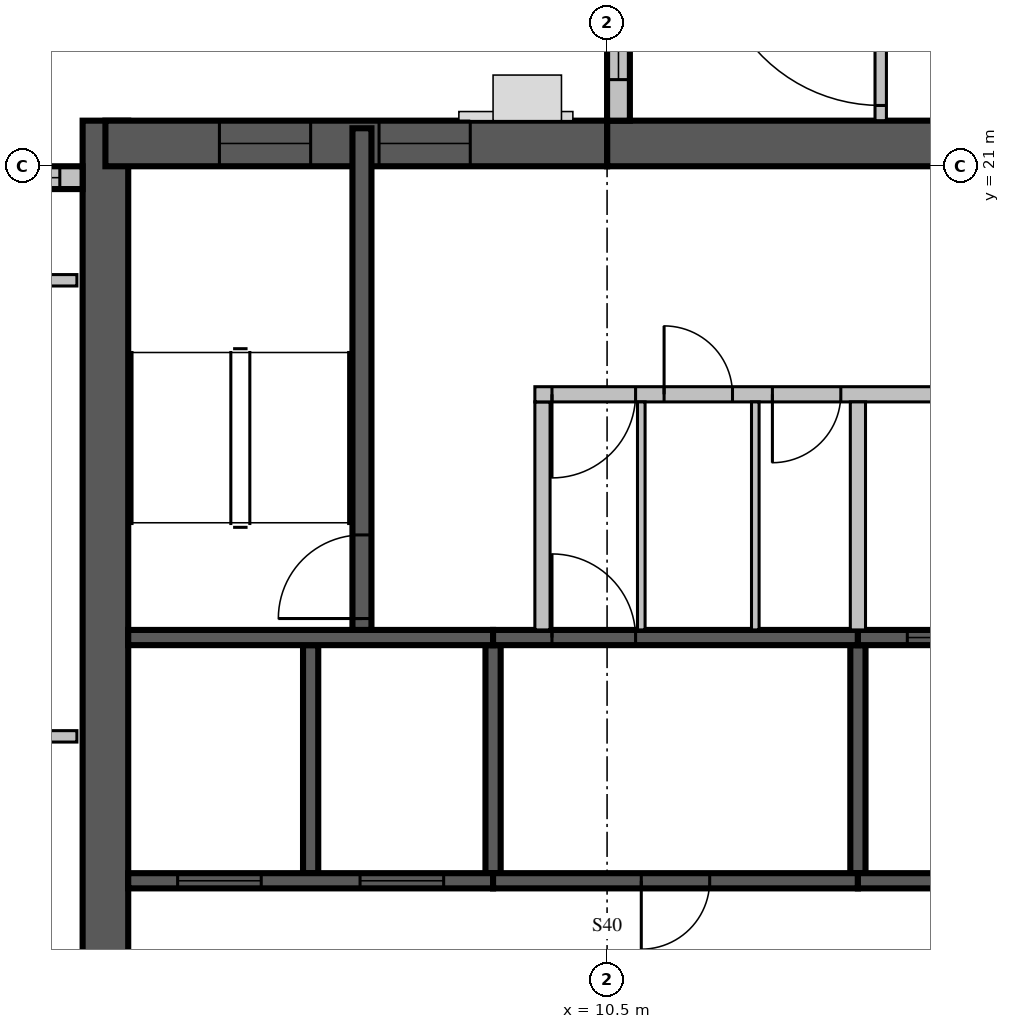
"""IFC4 building model, lengths in metres.
Left out: names, types, materials, properties, quantities, classifications, styles, units other than length and angle.
Written with IfcOpenShell. Run it as: python <this file> out.ifc"""

import sys

from ifc_helpers import new_model, si_unit, direction, frame, frame_2d, origin, place, context, subcontext, project, spatial, rectangle, extrude, source, transform, mapped, element, fill, save


model = new_model("IFC4")
c1 = context("Model", 3, precision=1e-05, world=origin(), true_north=direction((0.0, 1.0)))
c2 = subcontext(c1, "Body", "Model", "MODEL_VIEW")
j1 = project(units=[si_unit("LENGTHUNIT", "METRE"), si_unit("PLANEANGLEUNIT", "RADIAN")], contexts=[c1])
p1 = place(None, origin())
s1 = spatial("IfcSite", under=j1, at=p1, CompositionType="ELEMENT")
p2 = place(p1, origin())
s2 = spatial("IfcBuilding", under=s1, at=p2, CompositionType="ELEMENT")
p3 = place(p2, frame((0.0, 0.0, 330.0)))
s3 = spatial("IfcBuildingStorey", under=s2, at=p3, CompositionType="ELEMENT", Elevation=330.0)
m1 = source(origin(), c2, "Body", "SweptSolid", [
    extrude(rectangle(XDim=17.4, YDim=0.6, at=frame_2d((8.7, 0.0))), origin(), (0.0, 0.0, 1.0), 3.5),
])
p4 = place(p3, frame((3.9, 4.2, 0.0), z_axis=(0.0, 0.0, 1.0), x_axis=(0.0, 1.0, 0.0)))
e1 = element("IfcWall", 1, at=p4, inside=s3, PredefinedType="SHEAR", context=c2, shape_type="MappedRepresentation", body=[
    mapped(m1, transform((0.0, 0.0, 0.0), scale=1.0)),
])
m2 = source(origin(), c2, "Body", "SweptSolid", [
    extrude(rectangle(XDim=2.2, YDim=2.1, at=frame_2d((1.1, 1.05))), frame((0.0, 0.31, 0.0), z_axis=(0.0, -1.0, 0.0), x_axis=(1.0, 0.0, 0.0)), (0.0, 0.0, 1.0), 0.62),
])
p5 = place(p4, frame((4.2, 0.0, 0.0)))
e2 = element("IfcOpeningElement", 2, at=p5, cuts=e1, PredefinedType="OPENING", context=c2, shape_type="MappedRepresentation", body=[
    mapped(m2, transform((0.0, 0.0, 0.0), scale=1.0)),
])
m3 = source(origin(), c2, "Body", "SweptSolid", [
    extrude(rectangle(XDim=11.1, YDim=0.6, at=frame_2d((5.55, 0.0))), origin(), (0.0, 0.0, 1.0), 3.5),
])
p6 = place(p3, frame((10.5, 21.3, 0.0), z_axis=(0.0, 0.0, 1.0), x_axis=(1.0, 0.0, 0.0)))
e3 = element("IfcWall", 3, at=p6, inside=s3, PredefinedType="SHEAR", context=c2, shape_type="MappedRepresentation", body=[
    mapped(m3, transform((0.0, 0.0, 0.0), scale=1.0)),
])
m4 = source(origin(), c2, "Body", "SweptSolid", [
    extrude(rectangle(XDim=1.2, YDim=2.1, at=frame_2d((0.6, 1.05))), frame((0.0, 0.31, 0.0), z_axis=(0.0, -1.0, 0.0), x_axis=(1.0, 0.0, 0.0)), (0.0, 0.0, 1.0), 0.62),
])
p7 = place(p6, frame((8.7, 0.0, 0.0)))
e4 = element("IfcOpeningElement", 4, at=p7, cuts=e3, PredefinedType="OPENING", context=c2, shape_type="MappedRepresentation", body=[
    mapped(m4, transform((0.0, 0.0, 0.0), scale=1.0)),
])
m5 = source(origin(), c2, "Body", "SweptSolid", [
    extrude(rectangle(XDim=6.6, YDim=0.6, at=frame_2d((3.3, 0.0))), origin(), (0.0, 0.0, 1.0), 3.5),
])
p8 = place(p3, frame((3.9, 21.3, 0.0), z_axis=(0.0, 0.0, 1.0), x_axis=(1.0, 0.0, 0.0)))
e5 = element("IfcWall", 5, at=p8, inside=s3, PredefinedType="SHEAR", context=c2, shape_type="MappedRepresentation", body=[
    mapped(m5, transform((0.0, 0.0, 0.0), scale=1.0)),
])
m6 = source(origin(), c2, "Body", "SweptSolid", [
    extrude(rectangle(XDim=1.2, YDim=2.4, at=frame_2d((0.6, 1.2))), frame((0.0, 0.31, 0.0), z_axis=(0.0, -1.0, 0.0), x_axis=(1.0, 0.0, 0.0)), (0.0, 0.0, 1.0), 0.62),
])
p9 = place(p8, frame((1.5, 0.0, 0.6)))
e6 = element("IfcOpeningElement", 6, at=p9, cuts=e5, PredefinedType="OPENING", context=c2, shape_type="MappedRepresentation", body=[
    mapped(m6, transform((0.0, 0.0, 0.0), scale=1.0)),
])
p10 = place(p8, frame((3.6, 0.0, 0.6)))
e7 = element("IfcOpeningElement", 7, at=p10, cuts=e5, PredefinedType="OPENING", context=c2, shape_type="MappedRepresentation", body=[
    mapped(m6, transform((0.0, 0.0, 0.0), scale=1.0)),
])
m7 = source(origin(), c2, "Body", "SweptSolid", [
    extrude(rectangle(XDim=7.5, YDim=0.3, at=frame_2d((3.75, 0.0))), origin(), (0.0, 0.0, 1.0), 3.1),
])
p11 = place(p3, frame((10.65, 29.1, 0.0), z_axis=(0.0, 0.0, 1.0), x_axis=(0.0, -1.0, 0.0)))
e8 = element("IfcWall", 8, at=p11, inside=s3, PredefinedType="STANDARD", context=c2, shape_type="MappedRepresentation", body=[
    mapped(m7, transform((0.0, 0.0, 0.0), scale=1.0)),
])
m8 = source(origin(), c2, "Body", "SweptSolid", [
    extrude(rectangle(XDim=3.6, YDim=2.0, at=frame_2d((1.8, 1.0))), frame((0.0, 0.16, 0.0), z_axis=(0.0, -1.0, 0.0), x_axis=(1.0, 0.0, 0.0)), (0.0, 0.0, 1.0), 0.32),
])
p12 = place(p11, frame((3.36, 0.0, 0.6)))
e9 = element("IfcOpeningElement", 9, at=p12, cuts=e8, PredefinedType="OPENING", context=c2, shape_type="MappedRepresentation", body=[
    mapped(m8, transform((0.0, 0.0, 0.0), scale=1.0)),
])
m9 = source(origin(), c2, "Body", "SweptSolid", [
    extrude(rectangle(XDim=2.4, YDim=2.0, at=frame_2d((1.2, 1.0))), frame((0.0, 0.16, 0.0), z_axis=(0.0, -1.0, 0.0), x_axis=(1.0, 0.0, 0.0)), (0.0, 0.0, 1.0), 0.32),
])
p13 = place(p11, frame((0.48, 0.0, 0.6)))
e10 = element("IfcOpeningElement", 10, at=p13, cuts=e8, PredefinedType="OPENING", context=c2, shape_type="MappedRepresentation", body=[
    mapped(m9, transform((0.0, 0.0, 0.0), scale=1.0)),
])
m10 = source(origin(), c2, "Body", "SweptSolid", [
    extrude(rectangle(XDim=3.0, YDim=0.3, at=frame_2d((1.5, 0.0))), origin(), (0.0, 0.0, 1.0), 3.1),
])
p14 = place(p3, frame((3.6, 20.85, 0.0), z_axis=(0.0, 0.0, 1.0), x_axis=(-1.0, 0.0, 0.0)))
e11 = element("IfcWall", 11, at=p14, inside=s3, PredefinedType="STANDARD", context=c2, shape_type="MappedRepresentation", body=[
    mapped(m10, transform((0.0, 0.0, 0.0), scale=1.0)),
])
p15 = place(p14, frame((0.3, 0.0, 0.6)))
e12 = element("IfcOpeningElement", 12, at=p15, cuts=e11, PredefinedType="OPENING", context=c2, shape_type="MappedRepresentation", body=[
    mapped(m9, transform((0.0, 0.0, 0.0), scale=1.0)),
])
m11 = source(origin(), c2, "Body", "SweptSolid", [
    extrude(rectangle(XDim=3.0, YDim=0.2, at=frame_2d((1.5, 0.0))), origin(), (0.0, 0.0, 1.0), 3.5),
])
p16 = place(p3, frame((6.6, 11.7, 0.0), z_axis=(0.0, 0.0, 1.0), x_axis=(0.0, 1.0, 0.0)))
e13 = element("IfcWall", 13, at=p16, inside=s3, PredefinedType="SOLIDWALL", context=c2, shape_type="MappedRepresentation", body=[
    mapped(m11, transform((0.0, 0.0, 0.0), scale=1.0)),
])
m12 = source(origin(), c2, "Body", "SweptSolid", [
    extrude(rectangle(XDim=3.0, YDim=0.2, at=frame_2d((1.5, 0.0))), origin(), (0.0, 0.0, 1.0), 3.1),
])
for number, where, z_axis, x_axis in (
    (14, (9.0, 11.7, 0.0), (0.0, 0.0, 1.0), (0.0, 1.0, 0.0)),
    (15, (13.8, 11.7, 0.0), (0.0, 0.0, 1.0), (0.0, 1.0, 0.0)),
):
    element("IfcWall", number, at=place(p3, frame(where, z_axis=z_axis, x_axis=x_axis)), inside=s3, PredefinedType="SOLIDWALL", context=c2, shape_type="MappedRepresentation", body=[
        mapped(m12, transform((0.0, 0.0, 0.0), scale=1.0)),
    ])
m13 = source(origin(), c2, "Body", "SweptSolid", [
    extrude(rectangle(XDim=4.8, YDim=0.2, at=frame_2d((2.4, 0.0))), origin(), (0.0, 0.0, 1.0), 3.5),
])
p17 = place(p3, frame((4.2, 11.6, 0.0), z_axis=(0.0, 0.0, 1.0), x_axis=(1.0, 0.0, 0.0)))
e16 = element("IfcWall", 16, at=p17, inside=s3, PredefinedType="SOLIDWALL", context=c2, shape_type="MappedRepresentation", body=[
    mapped(m13, transform((0.0, 0.0, 0.0), scale=1.0)),
])
m14 = source(origin(), c2, "Body", "SweptSolid", [
    extrude(rectangle(XDim=1.1, YDim=2.1, at=frame_2d((0.55, 1.05))), frame((0.0, 0.11, 0.0), z_axis=(0.0, -1.0, 0.0), x_axis=(1.0, 0.0, 0.0)), (0.0, 0.0, 1.0), 0.22),
])
p18 = place(p17, frame((0.65, 0.0, 0.0)))
e17 = element("IfcOpeningElement", 17, at=p18, cuts=e16, PredefinedType="OPENING", context=c2, shape_type="MappedRepresentation", body=[
    mapped(m14, transform((0.0, 0.0, 0.0), scale=1.0)),
])
p19 = place(p17, frame((3.05, 0.0, 0.0)))
e18 = element("IfcOpeningElement", 18, at=p19, cuts=e16, PredefinedType="OPENING", context=c2, shape_type="MappedRepresentation", body=[
    mapped(m14, transform((0.0, 0.0, 0.0), scale=1.0)),
])
m15 = source(origin(), c2, "Body", "SweptSolid", [
    extrude(rectangle(XDim=4.8, YDim=0.2, at=frame_2d((2.4, 0.0))), origin(), (0.0, 0.0, 1.0), 3.1),
])
p20 = place(p3, frame((9.0, 11.6, 0.0), z_axis=(0.0, 0.0, 1.0), x_axis=(1.0, 0.0, 0.0)))
e19 = element("IfcWall", 19, at=p20, inside=s3, PredefinedType="SOLIDWALL", context=c2, shape_type="MappedRepresentation", body=[
    mapped(m15, transform((0.0, 0.0, 0.0), scale=1.0)),
])
m16 = source(origin(), c2, "Body", "SweptSolid", [
    extrude(rectangle(XDim=0.9, YDim=2.1, at=frame_2d((0.45, 1.05))), frame((0.0, 0.11, 0.0), z_axis=(0.0, -1.0, 0.0), x_axis=(1.0, 0.0, 0.0)), (0.0, 0.0, 1.0), 0.22),
])
p21 = place(p20, frame((1.95, 0.0, 0.0)))
e20 = element("IfcOpeningElement", 20, at=p21, cuts=e19, PredefinedType="OPENING", context=c2, shape_type="MappedRepresentation", body=[
    mapped(m16, transform((0.0, 0.0, 0.0), scale=1.0)),
])
m17 = source(origin(), c2, "Body", "SweptSolid", [
    extrude(rectangle(XDim=7.2, YDim=0.2, at=frame_2d((3.6, 0.0))), origin(), (0.0, 0.0, 1.0), 3.5),
])
p22 = place(p3, frame((13.8, 11.6, 0.0), z_axis=(0.0, 0.0, 1.0), x_axis=(1.0, 0.0, 0.0)))
e21 = element("IfcWall", 21, at=p22, inside=s3, PredefinedType="SOLIDWALL", context=c2, shape_type="MappedRepresentation", body=[
    mapped(m17, transform((0.0, 0.0, 0.0), scale=1.0)),
])
p23 = place(p3, frame((4.2, 14.8, 0.0), z_axis=(0.0, 0.0, 1.0), x_axis=(1.0, 0.0, 0.0)))
e22 = element("IfcWall", 22, at=p23, inside=s3, PredefinedType="SOLIDWALL", context=c2, shape_type="MappedRepresentation", body=[
    mapped(m13, transform((0.0, 0.0, 0.0), scale=1.0)),
])
p24 = place(p3, frame((9.0, 14.8, 0.0), z_axis=(0.0, 0.0, 1.0), x_axis=(1.0, 0.0, 0.0)))
e23 = element("IfcWall", 23, at=p24, inside=s3, PredefinedType="SOLIDWALL", context=c2, shape_type="MappedRepresentation", body=[
    mapped(m15, transform((0.0, 0.0, 0.0), scale=1.0)),
])
p25 = place(p24, frame((0.775, 0.0, 0.0)))
e24 = element("IfcOpeningElement", 24, at=p25, cuts=e23, PredefinedType="OPENING", context=c2, shape_type="MappedRepresentation", body=[
    mapped(m14, transform((0.0, 0.0, 0.0), scale=1.0)),
])
p26 = place(p3, frame((13.8, 14.8, 0.0), z_axis=(0.0, 0.0, 1.0), x_axis=(1.0, 0.0, 0.0)))
e25 = element("IfcWall", 25, at=p26, inside=s3, PredefinedType="SOLIDWALL", context=c2, shape_type="MappedRepresentation", body=[
    mapped(m17, transform((0.0, 0.0, 0.0), scale=1.0)),
])
p27 = place(p26, frame((0.65, 0.0, 0.0)))
e26 = element("IfcOpeningElement", 26, at=p27, cuts=e25, PredefinedType="OPENING", context=c2, shape_type="MappedRepresentation", body=[
    mapped(m14, transform((0.0, 0.0, 0.0), scale=1.0)),
])
p28 = place(p26, frame((3.05, 0.0, 0.0)))
e27 = element("IfcOpeningElement", 27, at=p28, cuts=e25, PredefinedType="OPENING", context=c2, shape_type="MappedRepresentation", body=[
    mapped(m14, transform((0.0, 0.0, 0.0), scale=1.0)),
])
p29 = place(p26, frame((5.45, 0.0, 0.0)))
e28 = element("IfcOpeningElement", 28, at=p29, cuts=e25, PredefinedType="OPENING", context=c2, shape_type="MappedRepresentation", body=[
    mapped(m14, transform((0.0, 0.0, 0.0), scale=1.0)),
])
m18 = source(origin(), c2, "Body", "SweptSolid", [
    extrude(rectangle(XDim=6.6, YDim=0.25, at=frame_2d((3.3, 0.0))), origin(), (0.0, 0.0, 1.0), 3.1),
])
p30 = place(p3, frame((7.275, 14.9, 0.0), z_axis=(0.0, 0.0, 1.0), x_axis=(0.0, 1.0, 0.0)))
e29 = element("IfcWall", 29, at=p30, inside=s3, PredefinedType="SOLIDWALL", context=c2, shape_type="MappedRepresentation", body=[
    mapped(m18, transform((0.0, 0.0, 0.0), scale=1.0)),
])
m19 = source(origin(), c2, "Body", "SweptSolid", [
    extrude(rectangle(XDim=1.1, YDim=2.1, at=frame_2d((0.55, 1.05))), frame((0.0, 0.135, 0.0), z_axis=(0.0, -1.0, 0.0), x_axis=(1.0, 0.0, 0.0)), (0.0, 0.0, 1.0), 0.27),
])
p31 = place(p30, frame((0.15, 0.0, 0.0)))
e30 = element("IfcOpeningElement", 30, at=p31, cuts=e29, PredefinedType="OPENING", context=c2, shape_type="MappedRepresentation", body=[
    mapped(m19, transform((0.0, 0.0, 0.0), scale=1.0)),
])
m20 = source(origin(), c2, "Body", "SweptSolid", [
    extrude(rectangle(XDim=3.0, YDim=0.2, at=frame_2d((1.5, 0.0))), origin(), (0.0, 0.0, 1.0), 3.1),
])
p32 = place(p3, frame((9.65, 14.9, 0.0), z_axis=(0.0, 0.0, 1.0), x_axis=(0.0, 1.0, 0.0)))
e31 = element("IfcWall", 31, at=p32, inside=s3, PredefinedType="PARTITIONING", context=c2, shape_type="MappedRepresentation", body=[
    mapped(m20, transform((0.0, 0.0, 0.0), scale=1.0)),
])
m21 = source(origin(), c2, "Body", "SweptSolid", [
    extrude(rectangle(XDim=11.45, YDim=0.2, at=frame_2d((5.725, 0.0))), origin(), (0.0, 0.0, 1.0), 3.1),
])
p33 = place(p3, frame((9.55, 18.0, 0.0), z_axis=(0.0, 0.0, 1.0), x_axis=(1.0, 0.0, 0.0)))
e32 = element("IfcWall", 32, at=p33, inside=s3, PredefinedType="PARTITIONING", context=c2, shape_type="MappedRepresentation", body=[
    mapped(m21, transform((0.0, 0.0, 0.0), scale=1.0)),
])
p34 = place(p33, frame((0.225, 0.0, 0.0)))
e33 = element("IfcOpeningElement", 33, at=p34, cuts=e32, PredefinedType="OPENING", context=c2, shape_type="MappedRepresentation", body=[
    mapped(m14, transform((0.0, 0.0, 0.0), scale=1.0)),
])
p35 = place(p33, frame((1.7, 0.0, 0.0)))
e34 = element("IfcOpeningElement", 34, at=p35, cuts=e32, PredefinedType="OPENING", context=c2, shape_type="MappedRepresentation", body=[
    mapped(m16, transform((0.0, 0.0, 0.0), scale=1.0)),
])
p36 = place(p33, frame((3.125, 0.0, 0.0)))
e35 = element("IfcOpeningElement", 35, at=p36, cuts=e32, PredefinedType="OPENING", context=c2, shape_type="MappedRepresentation", body=[
    mapped(m16, transform((0.0, 0.0, 0.0), scale=1.0)),
])
p37 = place(p33, frame((7.35, 0.0, 0.0)))
e36 = element("IfcOpeningElement", 36, at=p37, cuts=e32, PredefinedType="OPENING", context=c2, shape_type="MappedRepresentation", body=[
    mapped(m14, transform((0.0, 0.0, 0.0), scale=1.0)),
])
p38 = place(p3, frame((13.8, 14.9, 0.0), z_axis=(0.0, 0.0, 1.0), x_axis=(0.0, 1.0, 0.0)))
e37 = element("IfcWall", 37, at=p38, inside=s3, PredefinedType="PARTITIONING", context=c2, shape_type="MappedRepresentation", body=[
    mapped(m20, transform((0.0, 0.0, 0.0), scale=1.0)),
])
m22 = source(origin(), c2, "Body", "SweptSolid", [
    extrude(rectangle(XDim=3.0, YDim=0.1, at=frame_2d((1.5, 0.0))), origin(), (0.0, 0.0, 1.0), 3.1),
])
for number, where, z_axis, x_axis in (
    (38, (10.95, 14.9, 0.0), (0.0, 0.0, 1.0), (0.0, 1.0, 0.0)),
    (39, (12.45, 14.9, 0.0), (0.0, 0.0, 1.0), (0.0, 1.0, 0.0)),
):
    element("IfcWall", number, at=place(p3, frame(where, z_axis=z_axis, x_axis=x_axis)), inside=s3, PredefinedType="PARTITIONING", context=c2, shape_type="MappedRepresentation", body=[
        mapped(m22, transform((0.0, 0.0, 0.0), scale=1.0)),
    ])
m23 = source(origin(), c2, "Body", "SweptSolid", [
    extrude(rectangle(XDim=3.225, YDim=0.15, at=frame_2d((1.613, 0.0))), origin(), (0.0, 0.0, 1.0), 3.1),
])
p39 = place(p3, frame((0.3, 13.5, 0.0), z_axis=(0.0, 0.0, 1.0), x_axis=(1.0, 0.0, 0.0)))
e40 = element("IfcWall", 40, at=p39, inside=s3, PredefinedType="PARTITIONING", context=c2, shape_type="MappedRepresentation", body=[
    mapped(m23, transform((0.0, 0.0, 0.0), scale=1.0)),
])
m24 = source(origin(), c2, "Body", "SweptSolid", [
    extrude(rectangle(XDim=0.9, YDim=2.1, at=frame_2d((0.45, 1.05))), frame((0.0, 0.085, 0.0), z_axis=(0.0, -1.0, 0.0), x_axis=(1.0, 0.0, 0.0)), (0.0, 0.0, 1.0), 0.17),
])
p40 = place(p39, frame((1.2, 0.0, 0.0)))
e41 = element("IfcOpeningElement", 41, at=p40, cuts=e40, PredefinedType="OPENING", context=c2, shape_type="MappedRepresentation", body=[
    mapped(m24, transform((0.0, 0.0, 0.0), scale=1.0)),
])
p41 = place(p3, frame((0.3, 19.5, 0.0), z_axis=(0.0, 0.0, 1.0), x_axis=(1.0, 0.0, 0.0)))
e42 = element("IfcWall", 42, at=p41, inside=s3, PredefinedType="PARTITIONING", context=c2, shape_type="MappedRepresentation", body=[
    mapped(m23, transform((0.0, 0.0, 0.0), scale=1.0)),
])
p42 = place(p41, frame((1.2, 0.0, 0.0)))
e43 = element("IfcOpeningElement", 43, at=p42, cuts=e42, PredefinedType="OPENING", context=c2, shape_type="MappedRepresentation", body=[
    mapped(m24, transform((0.0, 0.0, 0.0), scale=1.0)),
])
m25 = source(origin(), c2, "Body", "SweptSolid", [
    extrude(rectangle(XDim=7.725, YDim=0.15, at=frame_2d((3.862, 0.0))), origin(), (0.0, 0.0, 1.0), 3.1),
])
p43 = place(p3, frame((14.1, 29.325, 0.0), z_axis=(0.0, 0.0, 1.0), x_axis=(0.0, -1.0, 0.0)))
e44 = element("IfcWall", 44, at=p43, inside=s3, PredefinedType="PARTITIONING", context=c2, shape_type="MappedRepresentation", body=[
    mapped(m25, transform((0.0, 0.0, 0.0), scale=1.0)),
])
m26 = source(origin(), c2, "Body", "SweptSolid", [
    extrude(rectangle(XDim=2.2, YDim=2.1, at=frame_2d((1.1, 1.05))), frame((0.0, 0.085, 0.0), z_axis=(0.0, -1.0, 0.0), x_axis=(1.0, 0.0, 0.0)), (0.0, 0.0, 1.0), 0.17),
])
p44 = place(p43, frame((5.325, 0.0, 0.0)))
e45 = element("IfcOpeningElement", 45, at=p44, cuts=e44, PredefinedType="OPENING", context=c2, shape_type="MappedRepresentation", body=[
    mapped(m26, transform((0.0, 0.0, 0.0), scale=1.0)),
])
m27 = source(origin(), c2, "Body", "SweptSolid", [
    extrude(rectangle(XDim=3.6, YDim=2.0, at=frame_2d((1.8, 1.0))), frame((0.0, 0.03, 0.0), z_axis=(0.0, -1.0, 0.0), x_axis=(1.0, 0.0, 0.0)), (0.0, 0.0, 1.0), 0.06),
])
p45 = place(p12, origin())
e46 = element("IfcWindow", 46, at=p45, inside=s3, PartitioningType="SINGLE_PANEL", PredefinedType="WINDOW", context=c2, shape_type="MappedRepresentation", body=[
    mapped(m27, transform((0.0, 0.0, 0.0), scale=1.0)),
])
fill(e9, e46)
m28 = source(origin(), c2, "Body", "SweptSolid", [
    extrude(rectangle(XDim=2.4, YDim=2.0, at=frame_2d((1.2, 1.0))), frame((0.0, 0.03, 0.0), z_axis=(0.0, -1.0, 0.0), x_axis=(1.0, 0.0, 0.0)), (0.0, 0.0, 1.0), 0.06),
])
p46 = place(p15, origin())
e47 = element("IfcWindow", 47, at=p46, inside=s3, PartitioningType="SINGLE_PANEL", PredefinedType="WINDOW", context=c2, shape_type="MappedRepresentation", body=[
    mapped(m28, transform((0.0, 0.0, 0.0), scale=1.0)),
])
fill(e12, e47)
m29 = source(origin(), c2, "Body", "SweptSolid", [
    extrude(rectangle(XDim=1.1, YDim=2.1, at=frame_2d((0.55, 1.05))), frame((0.0, 0.025, 0.0), z_axis=(0.0, -1.0, 0.0), x_axis=(1.0, 0.0, 0.0)), (0.0, 0.0, 1.0), 0.05),
])
p47 = place(p18, origin())
e48 = element("IfcDoor", 48, at=p47, inside=s3, OperationType="SLIDING_TO_LEFT", PredefinedType="DOOR", context=c2, shape_type="MappedRepresentation", body=[
    mapped(m29, transform((0.0, 0.0, 0.0), scale=1.0)),
])
fill(e17, e48)
p48 = place(p19, origin())
e49 = element("IfcDoor", 49, at=p48, inside=s3, OperationType="SLIDING_TO_LEFT", PredefinedType="DOOR", context=c2, shape_type="MappedRepresentation", body=[
    mapped(m29, transform((0.0, 0.0, 0.0), scale=1.0)),
])
fill(e18, e49)
m30 = source(origin(), c2, "Body", "SweptSolid", [
    extrude(rectangle(XDim=0.9, YDim=2.1, at=frame_2d((0.45, 1.05))), frame((0.0, 0.025, 0.0), z_axis=(0.0, -1.0, 0.0), x_axis=(1.0, 0.0, 0.0)), (0.0, 0.0, 1.0), 0.05),
])
p49 = place(p21, origin())
e50 = element("IfcDoor", 50, at=p49, inside=s3, OperationType="SINGLE_SWING_RIGHT", PredefinedType="DOOR", context=c2, shape_type="MappedRepresentation", body=[
    mapped(m30, transform((0.0, 0.0, 0.0), scale=1.0)),
])
fill(e20, e50)
p50 = place(p25, origin())
e51 = element("IfcDoor", 51, at=p50, inside=s3, OperationType="SINGLE_SWING_LEFT", PredefinedType="DOOR", context=c2, shape_type="MappedRepresentation", body=[
    mapped(m29, transform((0.0, 0.0, 0.0), scale=1.0)),
])
fill(e24, e51)
p51 = place(p27, origin())
e52 = element("IfcDoor", 52, at=p51, inside=s3, OperationType="SLIDING_TO_LEFT", PredefinedType="DOOR", context=c2, shape_type="MappedRepresentation", body=[
    mapped(m29, transform((0.0, 0.0, 0.0), scale=1.0)),
])
fill(e26, e52)
p52 = place(p31, origin())
e53 = element("IfcDoor", 53, at=p52, inside=s3, OperationType="SINGLE_SWING_LEFT", PredefinedType="DOOR", context=c2, shape_type="MappedRepresentation", body=[
    mapped(m29, transform((0.0, 0.0, 0.0), scale=1.0)),
])
fill(e30, e53)
p53 = place(p34, origin())
e54 = element("IfcDoor", 54, at=p53, inside=s3, OperationType="SINGLE_SWING_RIGHT", PredefinedType="DOOR", context=c2, shape_type="MappedRepresentation", body=[
    mapped(m29, transform((0.0, 0.0, 0.0), scale=1.0)),
])
fill(e33, e54)
p54 = place(p35, origin())
e55 = element("IfcDoor", 55, at=p54, inside=s3, OperationType="SINGLE_SWING_LEFT", PredefinedType="DOOR", context=c2, shape_type="MappedRepresentation", body=[
    mapped(m30, transform((0.0, 0.0, 0.0), scale=1.0)),
])
fill(e34, e55)
p55 = place(p36, origin())
e56 = element("IfcDoor", 56, at=p55, inside=s3, OperationType="SINGLE_SWING_RIGHT", PredefinedType="DOOR", context=c2, shape_type="MappedRepresentation", body=[
    mapped(m30, transform((0.0, 0.0, 0.0), scale=1.0)),
])
fill(e35, e56)
m31 = source(origin(), c2, "Body", "SweptSolid", [
    extrude(rectangle(XDim=1.2, YDim=2.4, at=frame_2d((0.6, 1.2))), frame((0.0, 0.03, 0.0), z_axis=(0.0, -1.0, 0.0), x_axis=(1.0, 0.0, 0.0)), (0.0, 0.0, 1.0), 0.06),
])
p56 = place(p9, origin())
e57 = element("IfcWindow", 57, at=p56, inside=s3, PartitioningType="SINGLE_PANEL", PredefinedType="WINDOW", context=c2, shape_type="MappedRepresentation", body=[
    mapped(m31, transform((0.0, 0.0, 0.0), scale=1.0)),
])
fill(e6, e57)
p57 = place(p10, origin())
e58 = element("IfcWindow", 58, at=p57, inside=s3, PartitioningType="SINGLE_PANEL", PredefinedType="WINDOW", context=c2, shape_type="MappedRepresentation", body=[
    mapped(m31, transform((0.0, 0.0, 0.0), scale=1.0)),
])
fill(e7, e58)
m32 = source(origin(), c2, "Body", "SweptSolid", [
    extrude(rectangle(XDim=2.2, YDim=2.1, at=frame_2d((1.1, 1.05))), frame((0.0, 0.025, 0.0), z_axis=(0.0, -1.0, 0.0), x_axis=(1.0, 0.0, 0.0)), (0.0, 0.0, 1.0), 0.05),
])
p58 = place(p44, origin())
e59 = element("IfcDoor", 59, at=p58, inside=s3, OperationType="DOUBLE_DOOR_SINGLE_SWING", PredefinedType="DOOR", context=c2, shape_type="MappedRepresentation", body=[
    mapped(m32, transform((0.0, 0.0, 0.0), scale=1.0)),
])
fill(e45, e59)
save(model, sys.argv[1])
